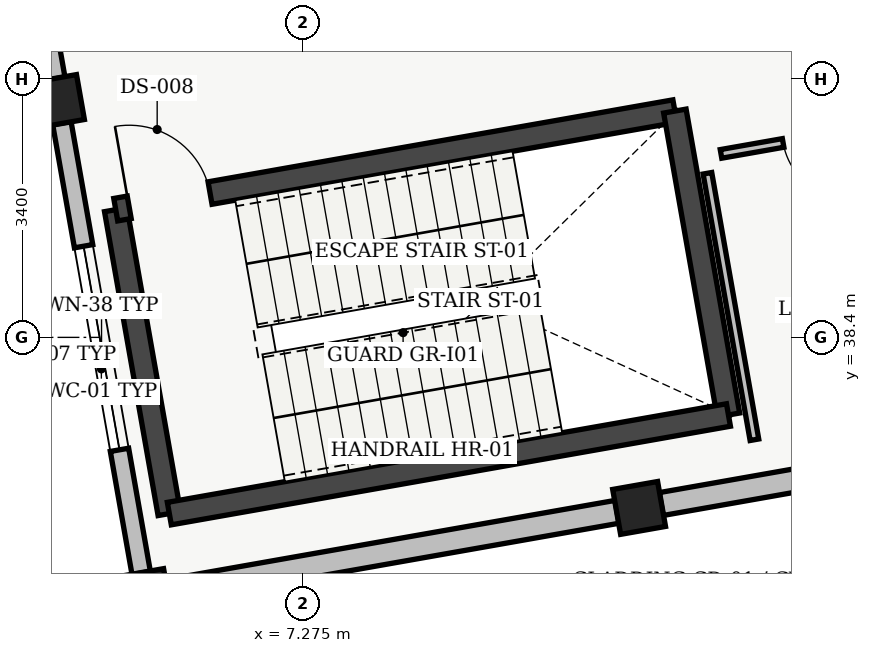
"""IFC4 building model, lengths in metres.
Left out: names, types, materials, properties, quantities, classifications, styles, units other than length and angle.
Written with IfcOpenShell. Run it as: python <this file> out.ifc"""

import sys

from ifc_helpers import new_model, si_unit, direction, frame, frame_2d, origin, origin_2d, place, context, subcontext, project, spatial, rectangle, extrude, element, fill, save


model = new_model("IFC4")
c1 = context("Model", 3, precision=1e-05, world=origin(), true_north=direction((0.0, 1.0)))
c2 = subcontext(c1, "Body", "Model", "MODEL_VIEW")
j1 = project(units=[si_unit("LENGTHUNIT", "METRE"), si_unit("PLANEANGLEUNIT", "RADIAN")], contexts=[c1])
p1 = place(None, origin())
s1 = spatial("IfcSite", under=j1, at=p1, CompositionType="ELEMENT")
p2 = place(p1, origin())
s2 = spatial("IfcBuilding", under=s1, at=p2, CompositionType="ELEMENT")
p3 = place(p2, frame((0.0, 0.0, 27.6)))
s3 = spatial("IfcBuildingStorey", under=s2, at=p3, CompositionType="ELEMENT", Elevation=27.6)
for number, where, z_axis, x_axis in (
    (1, (5.2, 35.01, 0.0), (0.0, 0.0, 1.0), (0.985, 0.174, 0.0)),
    (2, (4.054, 41.51, 0.0), (0.0, 0.0, 1.0), (0.985, 0.174, 0.0)),
    (3, (11.7, 36.156, 0.0), (0.0, 0.0, 1.0), (0.985, 0.174, 0.0)),
):
    element("IfcColumn", number, at=place(p3, frame(where, z_axis=z_axis, x_axis=x_axis)), inside=s3, PredefinedType="COLUMN", context=c2, shape_type="SweptSolid", body=[
        extrude(rectangle(XDim=0.6, YDim=0.6, at=origin_2d()), origin(), (0.0, 0.0, 1.0), 4.32),
    ])
p4 = place(p3, frame((5.149, 35.301, 0.0), z_axis=(0.0, 0.0, 1.0), x_axis=(-0.173620796507, 0.984812580657, 0.0)))
e4 = element("IfcWall", 4, at=p4, inside=s3, PredefinedType="STANDARD", context=c2, shape_type="SweptSolid", body=[
    extrude(rectangle(XDim=6.01, YDim=0.245, at=frame_2d((3.005, 0.0))), origin(), (0.0, 0.0, 1.0), 3.855),
])
p5 = place(p4, frame((1.645, 0.0, 0.95)))
e5 = element("IfcOpeningElement", 5, at=p5, cuts=e4, PredefinedType="OPENING", context=c2, shape_type="SweptSolid", body=[
    extrude(rectangle(XDim=2.72, YDim=1.44, at=frame_2d((1.36, 0.72))), frame((0.0, 0.123, 0.0), z_axis=(0.0, -1.0, 0.0), x_axis=(1.0, 0.0, 0.0)), (0.0, 0.0, 1.0), 0.245),
])
p6 = place(p3, frame((4.003, 41.8, 0.0), z_axis=(0.0, 0.0, 1.0), x_axis=(-0.173660194111, 0.984805634113, 0.0)))
e6 = element("IfcWall", 6, at=p6, inside=s3, PredefinedType="STANDARD", context=c2, shape_type="SweptSolid", body=[
    extrude(rectangle(XDim=6.01, YDim=0.29, at=frame_2d((3.005, 0.0))), origin(), (0.0, 0.0, 1.0), 3.855),
])
p7 = place(p6, frame((2.105, 0.0, 0.95)))
e7 = element("IfcOpeningElement", 7, at=p7, cuts=e6, PredefinedType="OPENING", context=c2, shape_type="SweptSolid", body=[
    extrude(rectangle(XDim=1.8, YDim=1.65, at=frame_2d((0.9, 0.825))), frame((0.0, 0.145, 0.0), z_axis=(0.0, -1.0, 0.0), x_axis=(1.0, 0.0, 0.0)), (0.0, 0.0, 1.0), 0.29),
])
p8 = place(p3, frame((17.909, 37.251, 0.0), z_axis=(0.0, 0.0, 1.0), x_axis=(-0.984805634113, -0.173660194111, 0.0)))
e8 = element("IfcWall", 8, at=p8, inside=s3, PredefinedType="STANDARD", context=c2, shape_type="SweptSolid", body=[
    extrude(rectangle(XDim=6.01, YDim=0.305, at=frame_2d((3.005, 0.0))), origin(), (0.0, 0.0, 1.0), 3.855),
])
p9 = place(p8, frame((1.805, 0.0, 0.95)))
e9 = element("IfcOpeningElement", 9, at=p9, cuts=e8, PredefinedType="OPENING", context=c2, shape_type="SweptSolid", body=[
    extrude(rectangle(XDim=2.4, YDim=1.65, at=frame_2d((1.2, 0.825))), frame((0.0, 0.152, 0.0), z_axis=(0.0, -1.0, 0.0), x_axis=(1.0, 0.0, 0.0)), (0.0, 0.0, 1.0), 0.305),
])
p10 = place(p3, frame((11.409, 36.105, 0.0), z_axis=(0.0, 0.0, 1.0), x_axis=(-0.984812580657, -0.173620796507, 0.0)))
e10 = element("IfcWall", 10, at=p10, inside=s3, PredefinedType="STANDARD", context=c2, shape_type="SweptSolid", body=[
    extrude(rectangle(XDim=6.01, YDim=0.305, at=frame_2d((3.005, 0.0))), origin(), (0.0, 0.0, 1.0), 3.855),
])
p11 = place(p3, frame((5.519, 36.082, 0.0), z_axis=(0.0, 0.0, 1.0), x_axis=(-0.173665267602, 0.984804739443, 0.0)))
e11 = element("IfcWall", 11, at=p11, inside=s3, PredefinedType="SHEAR", context=c2, shape_type="SweptSolid", body=[
    extrude(rectangle(XDim=4.06, YDim=0.3, at=frame_2d((2.03, 0.0))), origin(), (0.0, 0.0, 1.0), 4.28),
])
p12 = place(p3, frame((4.814, 40.08, 0.0), z_axis=(0.0, 0.0, 1.0), x_axis=(0.984802636214, 0.173677193974, 0.0)))
e12 = element("IfcWall", 12, at=p12, inside=s3, PredefinedType="SHEAR", context=c2, shape_type="SweptSolid", body=[
    extrude(rectangle(XDim=7.47, YDim=0.3, at=frame_2d((3.735, 0.0))), origin(), (0.0, 0.0, 1.0), 4.28),
])
p13 = place(p12, frame((0.18, 0.0, 0.0)))
e13 = element("IfcOpeningElement", 13, at=p13, cuts=e12, PredefinedType="OPENING", context=c2, shape_type="SweptSolid", body=[
    extrude(rectangle(XDim=1.08, YDim=2.15, at=frame_2d((0.54, 1.075))), frame((0.0, 0.15, 0.0), z_axis=(0.0, -1.0, 0.0), x_axis=(1.0, 0.0, 0.0)), (0.0, 0.0, 1.0), 0.3),
])
p14 = place(p3, frame((12.17, 41.377, 0.0), z_axis=(0.0, 0.0, 1.0), x_axis=(0.173654983803, -0.984806552883, 0.0)))
e14 = element("IfcWall", 14, at=p14, inside=s3, PredefinedType="SHEAR", context=c2, shape_type="SweptSolid", body=[
    extrude(rectangle(XDim=4.06, YDim=0.3, at=frame_2d((2.03, 0.0))), origin(), (0.0, 0.0, 1.0), 4.28),
])
p15 = place(p3, frame((12.875, 37.379, 0.0), z_axis=(0.0, 0.0, 1.0), x_axis=(-0.984808225754, -0.173645496596, 0.0)))
e15 = element("IfcWall", 15, at=p15, inside=s3, PredefinedType="SHEAR", context=c2, shape_type="SweptSolid", body=[
    extrude(rectangle(XDim=7.47, YDim=0.3, at=frame_2d((3.735, 0.0))), origin(), (0.0, 0.0, 1.0), 4.28),
])
p16 = place(p3, frame((15.298, 41.259, 0.0), z_axis=(0.0, 0.0, 1.0), x_axis=(-0.984803714572, -0.17367107924, 0.0)))
e16 = element("IfcWall", 16, at=p16, inside=s3, PredefinedType="PARTITIONING", context=c2, shape_type="SweptSolid", body=[
    extrude(rectangle(XDim=2.56, YDim=0.115, at=frame_2d((1.28, 0.0))), origin(), (0.0, 0.0, 1.0), 3.95),
])
p17 = place(p16, frame((0.83, 0.0, 0.0)))
e17 = element("IfcOpeningElement", 17, at=p17, cuts=e16, PredefinedType="OPENING", context=c2, shape_type="SweptSolid", body=[
    extrude(rectangle(XDim=0.9, YDim=2.1, at=frame_2d((0.45, 1.05))), frame((0.0, 0.058, 0.0), z_axis=(0.0, -1.0, 0.0), x_axis=(1.0, 0.0, 0.0)), (0.0, 0.0, 1.0), 0.115),
])
p18 = place(p3, frame((12.599, 40.559, 0.0), z_axis=(0.0, 0.0, 1.0), x_axis=(0.173644490041, -0.984808403233, 0.0)))
e18 = element("IfcWall", 18, at=p18, inside=s3, PredefinedType="PARTITIONING", context=c2, shape_type="SweptSolid", body=[
    extrude(rectangle(XDim=3.56, YDim=0.115, at=frame_2d((1.78, 0.0))), origin(), (0.0, 0.0, 1.0), 3.95),
])
p19 = place(p5, origin())
e19 = element("IfcWindow", 19, at=p19, inside=s3, PartitioningType="SINGLE_PANEL", PredefinedType="WINDOW", context=c2, shape_type="SweptSolid", body=[
    extrude(rectangle(XDim=2.72, YDim=1.44, at=frame_2d((1.36, 0.72))), frame((0.0, 0.03, 0.0), z_axis=(0.0, -1.0, 0.0), x_axis=(1.0, 0.0, 0.0)), (0.0, 0.0, 1.0), 0.06),
])
fill(e5, e19)
p20 = place(p13, origin())
e20 = element("IfcDoor", 20, at=p20, inside=s3, OperationType="SINGLE_SWING_LEFT", PredefinedType="DOOR", context=c2, shape_type="SweptSolid", body=[
    extrude(rectangle(XDim=1.08, YDim=2.15, at=frame_2d((0.54, 1.075))), frame((0.0, 0.025, 0.0), z_axis=(0.0, -1.0, 0.0), x_axis=(1.0, 0.0, 0.0)), (0.0, 0.0, 1.0), 0.05),
])
fill(e13, e20)
p21 = place(p17, origin())
e21 = element("IfcDoor", 21, at=p21, inside=s3, OperationType="SINGLE_SWING_LEFT", PredefinedType="DOOR", context=c2, shape_type="SweptSolid", body=[
    extrude(rectangle(XDim=0.9, YDim=2.1, at=frame_2d((0.45, 1.05))), frame((0.0, 0.025, 0.0), z_axis=(0.0, -1.0, 0.0), x_axis=(1.0, 0.0, 0.0)), (0.0, 0.0, 1.0), 0.05),
])
fill(e17, e21)
save(model, sys.argv[1])
